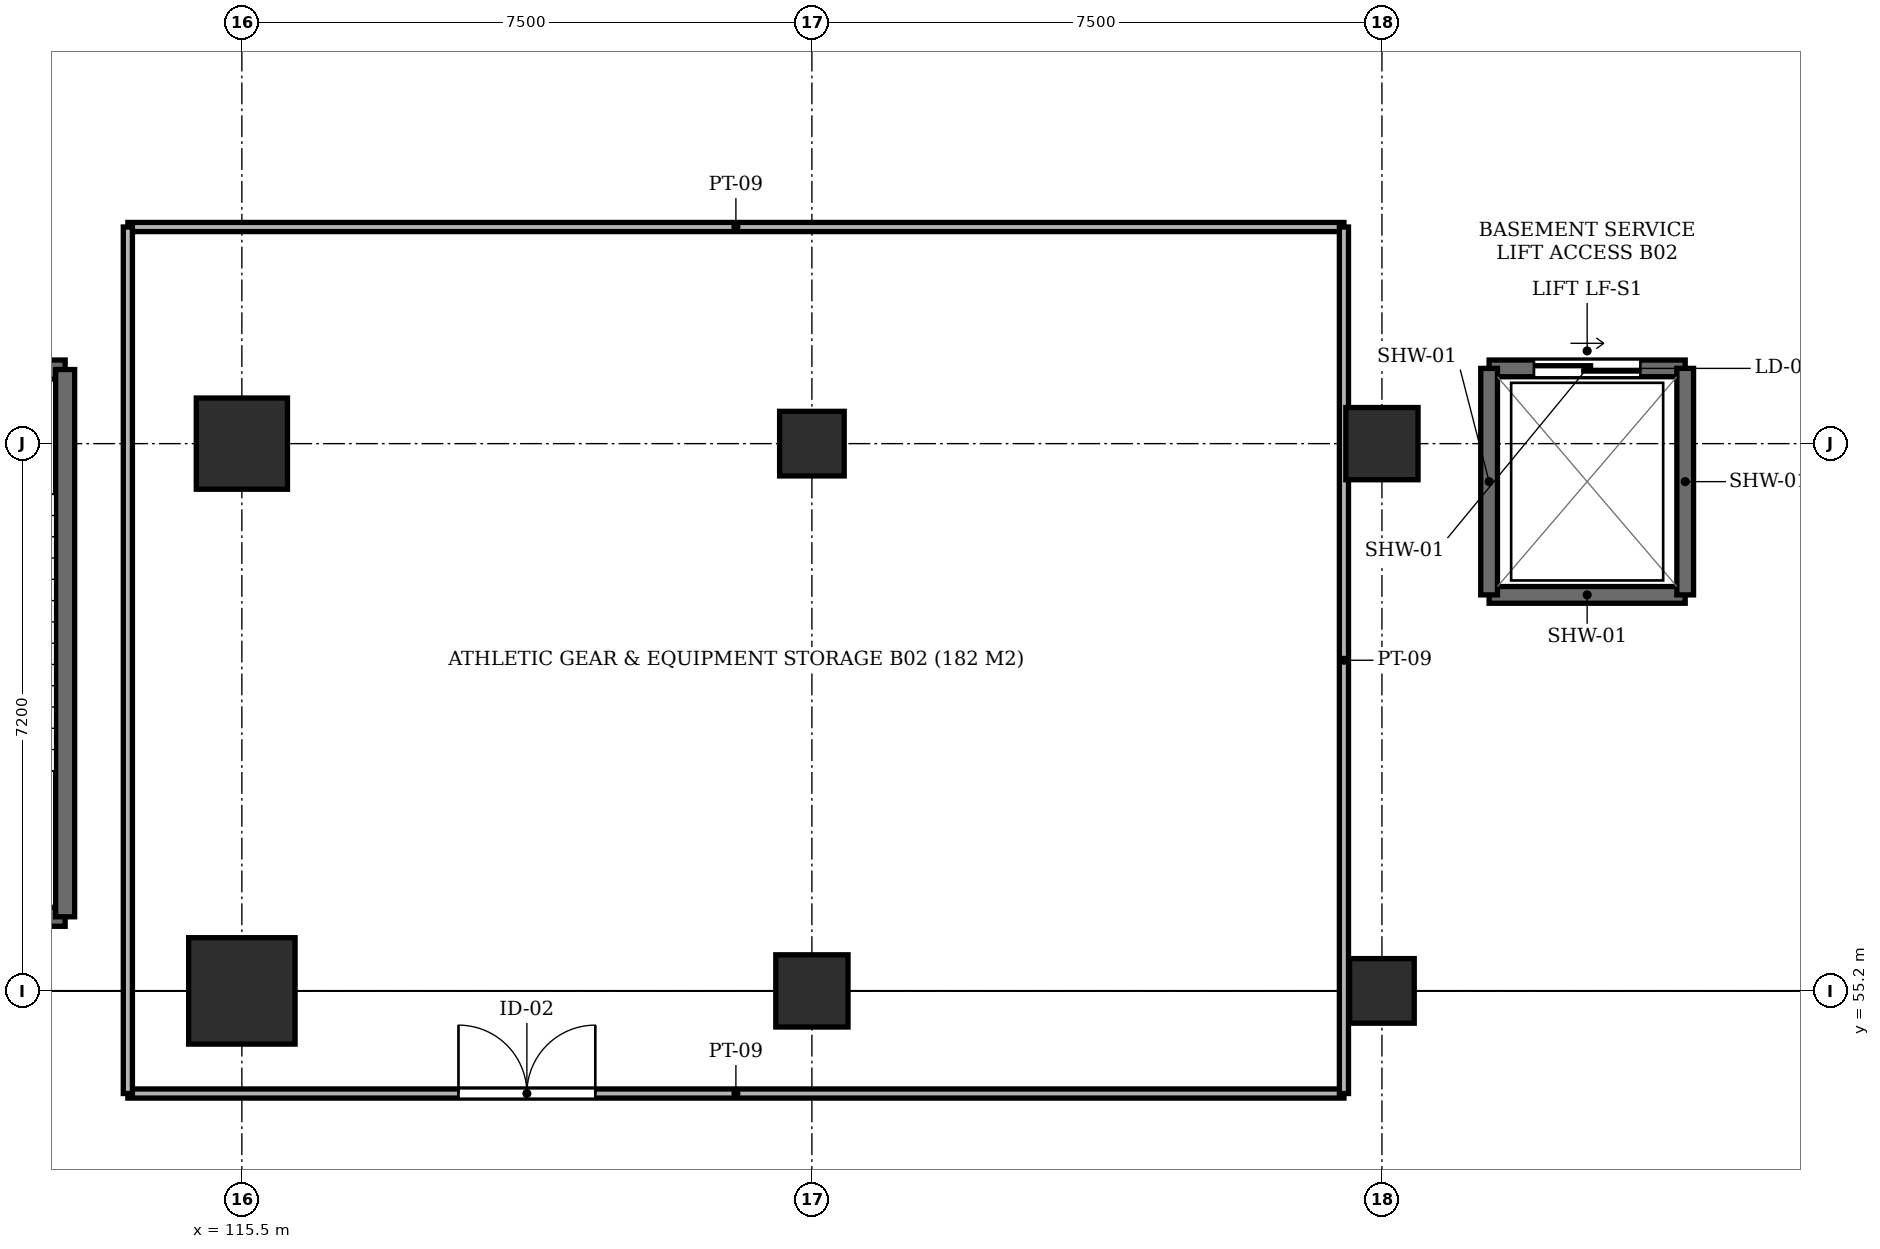
"""IFC4 building model, lengths in metres.
Left out: names, types, materials, properties, quantities, classifications, styles, units other than length and angle.
Written with IfcOpenShell. Run it as: python <this file> out.ifc"""

import sys

from ifc_helpers import new_model, si_unit, direction, frame, frame_2d, origin, origin_2d, place, context, subcontext, project, spatial, rectangle, extrude, element, fill, save


model = new_model("IFC4")
c1 = context("Model", 3, precision=1e-05, world=origin(), true_north=direction((0.0, 1.0)))
c2 = subcontext(c1, "Body", "Model", "MODEL_VIEW")
j1 = project(units=[si_unit("LENGTHUNIT", "METRE"), si_unit("PLANEANGLEUNIT", "RADIAN")], contexts=[c1])
p1 = place(None, origin())
s1 = spatial("IfcSite", under=j1, at=p1, CompositionType="ELEMENT")
p2 = place(p1, origin())
s2 = spatial("IfcBuilding", under=s1, at=p2, CompositionType="ELEMENT")
p3 = place(p2, frame((0.0, 0.0, -9.0)))
s3 = spatial("IfcBuildingStorey", under=s2, at=p3, CompositionType="ELEMENT", Elevation=-9.0)
p4 = place(p3, frame((115.5, 55.2, 0.0), z_axis=(0.0, 0.0, 1.0), x_axis=(1.0, 0.0, 0.0)))
e1 = element("IfcColumn", 1, at=p4, inside=s3, PredefinedType="COLUMN", context=c2, shape_type="SweptSolid", body=[
    extrude(rectangle(XDim=1.4, YDim=1.4, at=origin_2d()), origin(), (0.0, 0.0, 1.0), 4.18),
])
p5 = place(p3, frame((115.5, 62.4, 0.0), z_axis=(0.0, 0.0, 1.0), x_axis=(1.0, 0.0, 0.0)))
e2 = element("IfcColumn", 2, at=p5, inside=s3, PredefinedType="COLUMN", context=c2, shape_type="SweptSolid", body=[
    extrude(rectangle(XDim=1.2, YDim=1.2, at=origin_2d()), origin(), (0.0, 0.0, 1.0), 4.18),
])
p6 = place(p3, frame((123.0, 55.2, 0.0), z_axis=(0.0, 0.0, 1.0), x_axis=(1.0, 0.0, 0.0)))
e3 = element("IfcColumn", 3, at=p6, inside=s3, PredefinedType="COLUMN", context=c2, shape_type="SweptSolid", body=[
    extrude(rectangle(XDim=0.95, YDim=0.95, at=origin_2d()), origin(), (0.0, 0.0, 1.0), 4.18),
])
for number, where, z_axis, x_axis in (
    (4, (123.0, 62.4, 0.0), (0.0, 0.0, 1.0), (1.0, 0.0, 0.0)),
    (5, (130.5, 55.2, 0.0), (0.0, 0.0, 1.0), (1.0, 0.0, 0.0)),
):
    element("IfcColumn", number, at=place(p3, frame(where, z_axis=z_axis, x_axis=x_axis)), inside=s3, PredefinedType="COLUMN", context=c2, shape_type="SweptSolid", body=[
        extrude(rectangle(XDim=0.85, YDim=0.85, at=origin_2d()), origin(), (0.0, 0.0, 1.0), 4.18),
    ])
p7 = place(p3, frame((130.5, 62.4, 0.0), z_axis=(0.0, 0.0, 1.0), x_axis=(1.0, 0.0, 0.0)))
e6 = element("IfcColumn", 6, at=p7, inside=s3, PredefinedType="COLUMN", context=c2, shape_type="SweptSolid", body=[
    extrude(rectangle(XDim=0.95, YDim=0.95, at=origin_2d()), origin(), (0.0, 0.0, 1.0), 4.18),
])
p8 = place(p3, frame((108.925, 56.175, 0.0), z_axis=(0.0, 0.0, 1.0), x_axis=(1.0, 0.0, 0.0)))
e7 = element("IfcWall", 7, at=p8, inside=s3, PredefinedType="SHEAR", context=c2, shape_type="SweptSolid", body=[
    extrude(rectangle(XDim=4.25, YDim=0.25, at=frame_2d((2.125, 0.0))), origin(), (0.0, 0.0, 1.0), 4.18),
])
p9 = place(p3, frame((113.175, 63.375, 0.0), z_axis=(0.0, 0.0, 1.0), x_axis=(-1.0, 0.0, 0.0)))
e8 = element("IfcWall", 8, at=p9, inside=s3, PredefinedType="SHEAR", context=c2, shape_type="SweptSolid", body=[
    extrude(rectangle(XDim=4.25, YDim=0.25, at=frame_2d((2.125, 0.0))), origin(), (0.0, 0.0, 1.0), 4.18),
])
p10 = place(p9, frame((1.525, 0.0, 0.0)))
e9 = element("IfcOpeningElement", 9, at=p10, cuts=e8, PredefinedType="OPENING", context=c2, shape_type="SweptSolid", body=[
    extrude(rectangle(XDim=1.2, YDim=2.2, at=frame_2d((0.6, 1.1))), frame((0.0, 0.137, 0.0), z_axis=(0.0, -1.0, 0.0), x_axis=(1.0, 0.0, 0.0)), (0.0, 0.0, 1.0), 0.274),
])
p11 = place(p3, frame((113.175, 56.175, 0.0), z_axis=(0.0, 0.0, 1.0), x_axis=(0.0, 1.0, 0.0)))
e10 = element("IfcWall", 10, at=p11, inside=s3, PredefinedType="SHEAR", context=c2, shape_type="SweptSolid", body=[
    extrude(rectangle(XDim=7.2, YDim=0.25, at=frame_2d((3.6, 0.0))), origin(), (0.0, 0.0, 1.0), 4.18),
])
p12 = place(p3, frame((131.91, 60.41, 0.0), z_axis=(0.0, 0.0, 1.0), x_axis=(1.0, 0.0, 0.0)))
e11 = element("IfcWall", 11, at=p12, inside=s3, PredefinedType="SHEAR", context=c2, shape_type="SweptSolid", body=[
    extrude(rectangle(XDim=2.58, YDim=0.22, at=frame_2d((1.29, 0.0))), origin(), (0.0, 0.0, 1.0), 4.18),
])
p13 = place(p3, frame((134.49, 63.39, 0.0), z_axis=(0.0, 0.0, 1.0), x_axis=(-1.0, 0.0, 0.0)))
e12 = element("IfcWall", 12, at=p13, inside=s3, PredefinedType="SHEAR", context=c2, shape_type="SweptSolid", body=[
    extrude(rectangle(XDim=2.58, YDim=0.22, at=frame_2d((1.29, 0.0))), origin(), (0.0, 0.0, 1.0), 4.18),
])
p14 = place(p13, frame((0.59, 0.0, 0.0)))
e13 = element("IfcOpeningElement", 13, at=p14, cuts=e12, PredefinedType="OPENING", context=c2, shape_type="SweptSolid", body=[
    extrude(rectangle(XDim=1.4, YDim=2.3, at=frame_2d((0.7, 1.15))), frame((0.0, 0.122, 0.0), z_axis=(0.0, -1.0, 0.0), x_axis=(1.0, 0.0, 0.0)), (0.0, 0.0, 1.0), 0.244),
])
for number, where, z_axis, x_axis in (
    (14, (131.91, 63.39, 0.0), (0.0, 0.0, 1.0), (0.0, -1.0, 0.0)),
    (15, (134.49, 60.41, 0.0), (0.0, 0.0, 1.0), (0.0, 1.0, 0.0)),
):
    element("IfcWall", number, at=place(p3, frame(where, z_axis=z_axis, x_axis=x_axis)), inside=s3, PredefinedType="SHEAR", context=c2, shape_type="SweptSolid", body=[
        extrude(rectangle(XDim=2.98, YDim=0.22, at=frame_2d((1.49, 0.0))), origin(), (0.0, 0.0, 1.0), 4.18),
    ])
p15 = place(p3, frame((114.0, 53.85, 0.0), z_axis=(0.0, 0.0, 1.0), x_axis=(1.0, 0.0, 0.0)))
e16 = element("IfcWall", 16, at=p15, inside=s3, PredefinedType="PARTITIONING", context=c2, shape_type="SweptSolid", body=[
    extrude(rectangle(XDim=16.0, YDim=0.12, at=frame_2d((8.0, 0.0))), origin(), (0.0, 0.0, 1.0), 3.78),
])
p16 = place(p15, frame((4.35, 0.0, 0.0)))
e17 = element("IfcOpeningElement", 17, at=p16, cuts=e16, PredefinedType="OPENING", context=c2, shape_type="SweptSolid", body=[
    extrude(rectangle(XDim=1.8, YDim=2.25, at=frame_2d((0.9, 1.125))), frame((0.0, 0.072, 0.0), z_axis=(0.0, -1.0, 0.0), x_axis=(1.0, 0.0, 0.0)), (0.0, 0.0, 1.0), 0.144),
])
p17 = place(p3, frame((114.0, 65.25, 0.0), z_axis=(0.0, 0.0, 1.0), x_axis=(1.0, 0.0, 0.0)))
e18 = element("IfcWall", 18, at=p17, inside=s3, PredefinedType="PARTITIONING", context=c2, shape_type="SweptSolid", body=[
    extrude(rectangle(XDim=16.0, YDim=0.12, at=frame_2d((8.0, 0.0))), origin(), (0.0, 0.0, 1.0), 3.78),
])
for number, where, z_axis, x_axis in (
    (19, (114.0, 53.85, 0.0), (0.0, 0.0, 1.0), (0.0, 1.0, 0.0)),
    (20, (130.0, 53.85, 0.0), (0.0, 0.0, 1.0), (0.0, 1.0, 0.0)),
):
    element("IfcWall", number, at=place(p3, frame(where, z_axis=z_axis, x_axis=x_axis)), inside=s3, PredefinedType="PARTITIONING", context=c2, shape_type="SweptSolid", body=[
        extrude(rectangle(XDim=11.4, YDim=0.12, at=frame_2d((5.7, 0.0))), origin(), (0.0, 0.0, 1.0), 3.78),
    ])
p18 = place(p14, origin())
e21 = element("IfcDoor", 21, at=p18, inside=s3, OperationType="SLIDING_TO_LEFT", PredefinedType="DOOR", context=c2, shape_type="SweptSolid", body=[
    extrude(rectangle(XDim=1.4, YDim=2.3, at=frame_2d((0.7, 1.15))), frame((0.0, 0.025, 0.0), z_axis=(0.0, -1.0, 0.0), x_axis=(1.0, 0.0, 0.0)), (0.0, 0.0, 1.0), 0.05),
])
fill(e13, e21)
p19 = place(p16, origin())
e22 = element("IfcDoor", 22, at=p19, inside=s3, OperationType="DOUBLE_DOOR_SINGLE_SWING", PredefinedType="DOOR", context=c2, shape_type="SweptSolid", body=[
    extrude(rectangle(XDim=1.8, YDim=2.25, at=frame_2d((0.9, 1.125))), frame((0.0, 0.025, 0.0), z_axis=(0.0, -1.0, 0.0), x_axis=(1.0, 0.0, 0.0)), (0.0, 0.0, 1.0), 0.05),
])
fill(e17, e22)
save(model, sys.argv[1])
